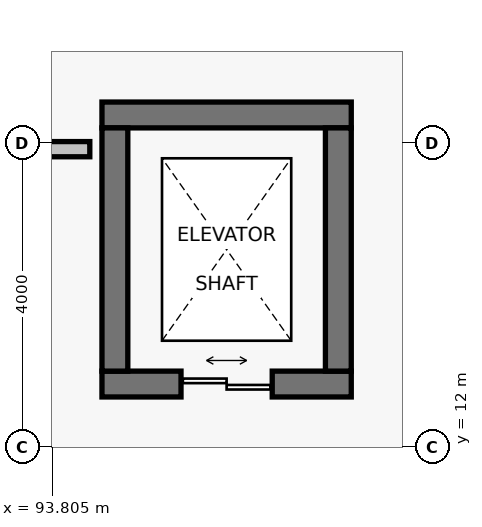
"""IFC4 building model, lengths in metres.
Left out: names, types, materials, properties, quantities, classifications, styles, units other than length and angle.
Written with IfcOpenShell. Run it as: python <this file> out.ifc"""

import sys

from ifc_helpers import new_model, si_unit, direction, frame, frame_2d, origin, place, context, subcontext, project, spatial, rectangle, extrude, element, fill, save


model = new_model("IFC4")
c1 = context("Model", 3, precision=1e-05, world=origin(), true_north=direction((0.0, 1.0)))
c2 = subcontext(c1, "Body", "Model", "MODEL_VIEW")
j1 = project(units=[si_unit("LENGTHUNIT", "METRE"), si_unit("PLANEANGLEUNIT", "RADIAN")], contexts=[c1])
p1 = place(None, origin())
s1 = spatial("IfcSite", under=j1, at=p1, CompositionType="ELEMENT")
p2 = place(p1, origin())
s2 = spatial("IfcBuilding", under=s1, at=p2, CompositionType="ELEMENT")
p3 = place(p2, frame((0.0, 0.0, -10.4)))
s3 = spatial("IfcBuildingStorey", under=s2, at=p3, CompositionType="ELEMENT", Elevation=-10.4)
p4 = place(p3, frame((94.46, 12.83, 0.0), z_axis=(0.0, 0.0, 1.0), x_axis=(1.0, 0.0, 0.0)))
e1 = element("IfcWall", 1, at=p4, inside=s3, PredefinedType="SHEAR", context=c2, shape_type="SweptSolid", body=[
    extrude(rectangle(XDim=3.28, YDim=0.34, at=frame_2d((1.64, 0.0))), origin(), (0.0, 0.0, 1.0), 5.15),
])
p5 = place(p4, frame((1.04, 0.0, 0.0)))
e2 = element("IfcOpeningElement", 2, at=p5, cuts=e1, PredefinedType="OPENING", context=c2, shape_type="SweptSolid", body=[
    extrude(rectangle(XDim=1.2, YDim=2.2, at=frame_2d((0.6, 1.1))), frame((0.0, 0.185, 0.0), z_axis=(0.0, -1.0, 0.0), x_axis=(1.0, 0.0, 0.0)), (0.0, 0.0, 1.0), 0.37),
])
p6 = place(p3, frame((97.74, 16.37, 0.0), z_axis=(0.0, 0.0, 1.0), x_axis=(-1.0, 0.0, 0.0)))
e3 = element("IfcWall", 3, at=p6, inside=s3, PredefinedType="SHEAR", context=c2, shape_type="SweptSolid", body=[
    extrude(rectangle(XDim=3.28, YDim=0.34, at=frame_2d((1.64, 0.0))), origin(), (0.0, 0.0, 1.0), 5.15),
])
for number, where, z_axis, x_axis in (
    (4, (94.63, 16.2, 0.0), (0.0, 0.0, 1.0), (0.0, -1.0, 0.0)),
    (5, (97.57, 13.0, 0.0), (0.0, 0.0, 1.0), (0.0, 1.0, 0.0)),
):
    element("IfcWall", number, at=place(p3, frame(where, z_axis=z_axis, x_axis=x_axis)), inside=s3, PredefinedType="SHEAR", context=c2, shape_type="SweptSolid", body=[
        extrude(rectangle(XDim=3.2, YDim=0.34, at=frame_2d((1.6, 0.0))), origin(), (0.0, 0.0, 1.0), 5.15),
    ])
p7 = place(p3, frame((48.7, 15.92, 0.0), z_axis=(0.0, 0.0, 1.0), x_axis=(1.0, 0.0, 0.0)))
e6 = element("IfcWall", 6, at=p7, inside=s3, PredefinedType="PARTITIONING", context=c2, shape_type="SweptSolid", body=[
    extrude(rectangle(XDim=45.6, YDim=0.2, at=frame_2d((22.8, 0.0))), origin(), (0.0, 0.0, 1.0), 4.48),
])
p8 = place(p7, frame((22.25, 0.0, 0.0)))
e7 = element("IfcOpeningElement", 7, at=p8, cuts=e6, PredefinedType="OPENING", context=c2, shape_type="SweptSolid", body=[
    extrude(rectangle(XDim=1.1, YDim=2.15, at=frame_2d((0.55, 1.075))), frame((0.0, 0.115, 0.0), z_axis=(0.0, -1.0, 0.0), x_axis=(1.0, 0.0, 0.0)), (0.0, 0.0, 1.0), 0.23),
])
p9 = place(p5, origin())
e8 = element("IfcDoor", 8, at=p9, inside=s3, OperationType="DOUBLE_DOOR_SLIDING", PredefinedType="DOOR", context=c2, shape_type="SweptSolid", body=[
    extrude(rectangle(XDim=1.2, YDim=2.2, at=frame_2d((0.6, 1.1))), frame((0.0, 0.025, 0.0), z_axis=(0.0, -1.0, 0.0), x_axis=(1.0, 0.0, 0.0)), (0.0, 0.0, 1.0), 0.05),
])
fill(e2, e8)
save(model, sys.argv[1])
